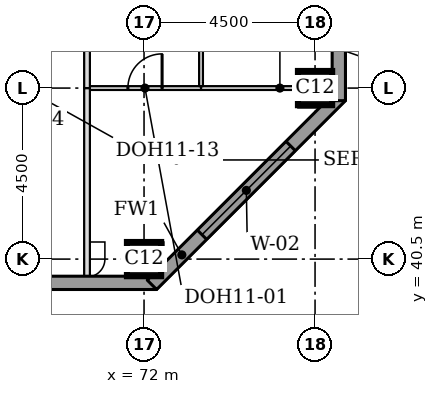
"""IFC4 building model, lengths in metres.
Left out: names, types, materials, properties, quantities, classifications, styles, units other than length and angle.
Written with IfcOpenShell. Run it as: python <this file> out.ifc"""

import sys

from ifc_helpers import new_model, si_unit, direction, frame, frame_2d, origin, origin_2d, place, context, subcontext, project, spatial, rectangle, extrude, element, fill, save


model = new_model("IFC4")
c1 = context("Model", 3, precision=1e-05, world=origin(), true_north=direction((0.0, 1.0)))
c2 = subcontext(c1, "Body", "Model", "MODEL_VIEW")
j1 = project(units=[si_unit("LENGTHUNIT", "METRE"), si_unit("PLANEANGLEUNIT", "RADIAN")], contexts=[c1])
p1 = place(None, origin())
s1 = spatial("IfcSite", under=j1, at=p1, CompositionType="ELEMENT")
p2 = place(p1, origin())
s2 = spatial("IfcBuilding", under=s1, at=p2, CompositionType="ELEMENT")
p3 = place(p2, frame((0.0, 0.0, 234.1)))
s3 = spatial("IfcBuildingStorey", under=s2, at=p3, CompositionType="ELEMENT", Elevation=234.1)
for number, where, z_axis, x_axis in (
    (1, (72.0, 40.5, 0.0), (0.0, 0.0, 1.0), (1.0, 0.0, 0.0)),
    (2, (76.5, 45.0, 0.0), (0.0, 0.0, 1.0), (1.0, 0.0, 0.0)),
):
    element("IfcColumn", number, at=place(p3, frame(where, z_axis=z_axis, x_axis=x_axis)), inside=s3, PredefinedType="COLUMN", context=c2, shape_type="SweptSolid", body=[
        extrude(rectangle(XDim=0.9, YDim=0.9, at=origin_2d()), origin(), (0.0, 0.0, 1.0), 3.7),
    ])
p4 = place(p3, frame((36.0, 39.875, 0.0), z_axis=(0.0, 0.0, 1.0), x_axis=(1.0, 0.0, 0.0)))
e3 = element("IfcWall", 3, at=p4, inside=s3, PredefinedType="STANDARD", context=c2, shape_type="SweptSolid", body=[
    extrude(rectangle(XDim=36.331, YDim=0.35, at=frame_2d((18.166, 0.0))), origin(), (0.0, 0.0, 1.0), 3.525),
])
p5 = place(p4, frame((5.1, 0.0, 0.9)))
e4 = element("IfcOpeningElement", 4, at=p5, cuts=e3, PredefinedType="OPENING", context=c2, shape_type="SweptSolid", body=[
    extrude(rectangle(XDim=3.3, YDim=1.9, at=frame_2d((1.65, 0.95))), frame((0.0, 0.185, 0.0), z_axis=(0.0, -1.0, 0.0), x_axis=(1.0, 0.0, 0.0)), (0.0, 0.0, 1.0), 0.37),
])
p6 = place(p4, frame((9.6, 0.0, 0.9)))
e5 = element("IfcOpeningElement", 5, at=p6, cuts=e3, PredefinedType="OPENING", context=c2, shape_type="SweptSolid", body=[
    extrude(rectangle(XDim=3.3, YDim=1.9, at=frame_2d((1.65, 0.95))), frame((0.0, 0.185, 0.0), z_axis=(0.0, -1.0, 0.0), x_axis=(1.0, 0.0, 0.0)), (0.0, 0.0, 1.0), 0.37),
])
p7 = place(p4, frame((14.1, 0.0, 0.9)))
e6 = element("IfcOpeningElement", 6, at=p7, cuts=e3, PredefinedType="OPENING", context=c2, shape_type="SweptSolid", body=[
    extrude(rectangle(XDim=3.3, YDim=1.9, at=frame_2d((1.65, 0.95))), frame((0.0, 0.185, 0.0), z_axis=(0.0, -1.0, 0.0), x_axis=(1.0, 0.0, 0.0)), (0.0, 0.0, 1.0), 0.37),
])
p8 = place(p4, frame((18.6, 0.0, 0.9)))
e7 = element("IfcOpeningElement", 7, at=p8, cuts=e3, PredefinedType="OPENING", context=c2, shape_type="SweptSolid", body=[
    extrude(rectangle(XDim=3.3, YDim=1.9, at=frame_2d((1.65, 0.95))), frame((0.0, 0.185, 0.0), z_axis=(0.0, -1.0, 0.0), x_axis=(1.0, 0.0, 0.0)), (0.0, 0.0, 1.0), 0.37),
])
p9 = place(p4, frame((23.1, 0.0, 0.9)))
e8 = element("IfcOpeningElement", 8, at=p9, cuts=e3, PredefinedType="OPENING", context=c2, shape_type="SweptSolid", body=[
    extrude(rectangle(XDim=3.3, YDim=1.9, at=frame_2d((1.65, 0.95))), frame((0.0, 0.185, 0.0), z_axis=(0.0, -1.0, 0.0), x_axis=(1.0, 0.0, 0.0)), (0.0, 0.0, 1.0), 0.37),
])
p10 = place(p4, frame((27.6, 0.0, 0.9)))
e9 = element("IfcOpeningElement", 9, at=p10, cuts=e3, PredefinedType="OPENING", context=c2, shape_type="SweptSolid", body=[
    extrude(rectangle(XDim=3.3, YDim=1.9, at=frame_2d((1.65, 0.95))), frame((0.0, 0.185, 0.0), z_axis=(0.0, -1.0, 0.0), x_axis=(1.0, 0.0, 0.0)), (0.0, 0.0, 1.0), 0.37),
])
p11 = place(p3, frame((72.208, 39.824, 0.0), z_axis=(0.0, 0.0, 1.0), x_axis=(0.707106781187, 0.707106781187, 0.0)))
e10 = element("IfcWall", 10, at=p11, inside=s3, PredefinedType="STANDARD", context=c2, shape_type="SweptSolid", body=[
    extrude(rectangle(XDim=7.027, YDim=0.35, at=frame_2d((3.513, 0.0))), origin(), (0.0, 0.0, 1.0), 3.525),
])
p12 = place(p11, frame((1.863, 0.0, 0.9)))
e11 = element("IfcOpeningElement", 11, at=p12, cuts=e10, PredefinedType="OPENING", context=c2, shape_type="SweptSolid", body=[
    extrude(rectangle(XDim=3.3, YDim=1.9, at=frame_2d((1.65, 0.95))), frame((0.0, 0.185, 0.0), z_axis=(0.0, -1.0, 0.0), x_axis=(1.0, 0.0, 0.0)), (0.0, 0.0, 1.0), 0.37),
])
p13 = place(p3, frame((77.125, 44.669, 0.0), z_axis=(0.0, 0.0, 1.0), x_axis=(0.0, 1.0, 0.0)))
e12 = element("IfcWall", 12, at=p13, inside=s3, PredefinedType="STANDARD", context=c2, shape_type="SweptSolid", body=[
    extrude(rectangle(XDim=32.163, YDim=0.35, at=frame_2d((16.081, 0.0))), origin(), (0.0, 0.0, 1.0), 3.525),
])
p14 = place(p13, frame((5.431, 0.0, 0.9)))
e13 = element("IfcOpeningElement", 13, at=p14, cuts=e12, PredefinedType="OPENING", context=c2, shape_type="SweptSolid", body=[
    extrude(rectangle(XDim=3.3, YDim=1.9, at=frame_2d((1.65, 0.95))), frame((0.0, 0.185, 0.0), z_axis=(0.0, -1.0, 0.0), x_axis=(1.0, 0.0, 0.0)), (0.0, 0.0, 1.0), 0.37),
])
p15 = place(p13, frame((9.931, 0.0, 0.9)))
e14 = element("IfcOpeningElement", 14, at=p15, cuts=e12, PredefinedType="OPENING", context=c2, shape_type="SweptSolid", body=[
    extrude(rectangle(XDim=3.3, YDim=1.9, at=frame_2d((1.65, 0.95))), frame((0.0, 0.185, 0.0), z_axis=(0.0, -1.0, 0.0), x_axis=(1.0, 0.0, 0.0)), (0.0, 0.0, 1.0), 0.37),
])
p16 = place(p13, frame((14.431, 0.0, 0.9)))
e15 = element("IfcOpeningElement", 15, at=p16, cuts=e12, PredefinedType="OPENING", context=c2, shape_type="SweptSolid", body=[
    extrude(rectangle(XDim=3.3, YDim=1.9, at=frame_2d((1.65, 0.95))), frame((0.0, 0.185, 0.0), z_axis=(0.0, -1.0, 0.0), x_axis=(1.0, 0.0, 0.0)), (0.0, 0.0, 1.0), 0.37),
])
p17 = place(p13, frame((18.931, 0.0, 0.9)))
e16 = element("IfcOpeningElement", 16, at=p17, cuts=e12, PredefinedType="OPENING", context=c2, shape_type="SweptSolid", body=[
    extrude(rectangle(XDim=3.3, YDim=1.9, at=frame_2d((1.65, 0.95))), frame((0.0, 0.185, 0.0), z_axis=(0.0, -1.0, 0.0), x_axis=(1.0, 0.0, 0.0)), (0.0, 0.0, 1.0), 0.37),
])
p18 = place(p13, frame((23.431, 0.0, 0.9)))
e17 = element("IfcOpeningElement", 17, at=p18, cuts=e12, PredefinedType="OPENING", context=c2, shape_type="SweptSolid", body=[
    extrude(rectangle(XDim=3.3, YDim=1.9, at=frame_2d((1.65, 0.95))), frame((0.0, 0.185, 0.0), z_axis=(0.0, -1.0, 0.0), x_axis=(1.0, 0.0, 0.0)), (0.0, 0.0, 1.0), 0.37),
])
p19 = place(p3, frame((70.575, 45.0, 0.0), z_axis=(0.0, 0.0, 1.0), x_axis=(1.0, 0.0, 0.0)))
e18 = element("IfcWall", 18, at=p19, inside=s3, PredefinedType="PARTITIONING", context=c2, shape_type="SweptSolid", body=[
    extrude(rectangle(XDim=2.925, YDim=0.1, at=frame_2d((1.462, 0.0))), origin(), (0.0, 0.0, 1.0), 3.096),
])
p20 = place(p19, frame((1.0, 0.0, 0.0)))
e19 = element("IfcOpeningElement", 19, at=p20, cuts=e18, PredefinedType="OPENING", context=c2, shape_type="SweptSolid", body=[
    extrude(rectangle(XDim=0.9, YDim=2.1, at=frame_2d((0.45, 1.05))), frame((0.0, 0.06, 0.0), z_axis=(0.0, -1.0, 0.0), x_axis=(1.0, 0.0, 0.0)), (0.0, 0.0, 1.0), 0.12),
])
p21 = place(p3, frame((73.5, 45.0, 0.0), z_axis=(0.0, 0.0, 1.0), x_axis=(1.0, 0.0, 0.0)))
e20 = element("IfcWall", 20, at=p21, inside=s3, PredefinedType="PARTITIONING", context=c2, shape_type="SweptSolid", body=[
    extrude(rectangle(XDim=2.55, YDim=0.1, at=frame_2d((1.275, 0.0))), origin(), (0.0, 0.0, 1.0), 3.096),
])
p22 = place(p3, frame((70.5, 40.05, 0.0), z_axis=(0.0, 0.0, 1.0), x_axis=(0.0, 1.0, 0.0)))
e21 = element("IfcWall", 21, at=p22, inside=s3, PredefinedType="PARTITIONING", context=c2, shape_type="SweptSolid", body=[
    extrude(rectangle(XDim=4.95, YDim=0.15, at=frame_2d((2.475, 0.0))), origin(), (0.0, 0.0, 1.0), 3.55),
])
p23 = place(p3, frame((70.5, 45.0, 0.0), z_axis=(0.0, 0.0, 1.0), x_axis=(0.0, 1.0, 0.0)))
e22 = element("IfcWall", 22, at=p23, inside=s3, PredefinedType="PARTITIONING", context=c2, shape_type="SweptSolid", body=[
    extrude(rectangle(XDim=18.0, YDim=0.15, at=frame_2d((9.0, 0.0))), origin(), (0.0, 0.0, 1.0), 3.55),
])
p24 = place(p23, frame((8.5, 0.0, 0.0)))
e23 = element("IfcOpeningElement", 23, at=p24, cuts=e22, PredefinedType="OPENING", context=c2, shape_type="SweptSolid", body=[
    extrude(rectangle(XDim=1.0, YDim=2.1, at=frame_2d((0.5, 1.05))), frame((0.0, 0.085, 0.0), z_axis=(0.0, -1.0, 0.0), x_axis=(1.0, 0.0, 0.0)), (0.0, 0.0, 1.0), 0.17),
])
p25 = place(p3, frame((73.5, 45.05, 0.0), z_axis=(0.0, 0.0, 1.0), x_axis=(0.0, 1.0, 0.0)))
e24 = element("IfcWall", 24, at=p25, inside=s3, PredefinedType="PARTITIONING", context=c2, shape_type="SweptSolid", body=[
    extrude(rectangle(XDim=4.45, YDim=0.1, at=frame_2d((2.225, 0.0))), origin(), (0.0, 0.0, 1.0), 3.55),
])
p26 = place(p25, frame((1.8, 0.0, 0.0)))
e25 = element("IfcOpeningElement", 25, at=p26, cuts=e24, PredefinedType="OPENING", context=c2, shape_type="SweptSolid", body=[
    extrude(rectangle(XDim=0.9, YDim=2.1, at=frame_2d((0.45, 1.05))), frame((0.0, 0.06, 0.0), z_axis=(0.0, -1.0, 0.0), x_axis=(1.0, 0.0, 0.0)), (0.0, 0.0, 1.0), 0.12),
])
p27 = place(p12, origin())
e26 = element("IfcWindow", 26, at=p27, inside=s3, PartitioningType="SINGLE_PANEL", PredefinedType="WINDOW", context=c2, shape_type="SweptSolid", body=[
    extrude(rectangle(XDim=3.3, YDim=1.9, at=frame_2d((1.65, 0.95))), frame((0.0, 0.085, 0.0), z_axis=(0.0, -1.0, 0.0), x_axis=(1.0, 0.0, 0.0)), (0.0, 0.0, 1.0), 0.06),
])
fill(e11, e26)
p28 = place(p20, origin())
e27 = element("IfcDoor", 27, at=p28, inside=s3, OperationType="SINGLE_SWING_RIGHT", PredefinedType="DOOR", context=c2, shape_type="SweptSolid", body=[
    extrude(rectangle(XDim=0.9, YDim=2.1, at=frame_2d((0.45, 1.05))), frame((0.0, 0.025, 0.0), z_axis=(0.0, -1.0, 0.0), x_axis=(1.0, 0.0, 0.0)), (0.0, 0.0, 1.0), 0.05),
])
fill(e19, e27)
save(model, sys.argv[1])
